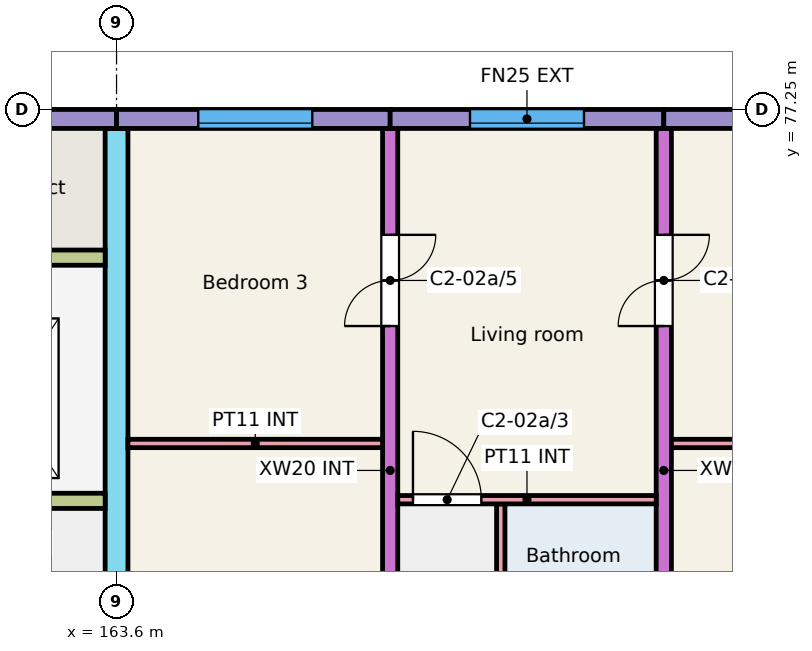
"""IFC4 building model, lengths in metres.
Left out: names, types, materials, properties, quantities, classifications, styles, units other than length and angle.
Written with IfcOpenShell. Run it as: python <this file> out.ifc"""

import sys

from ifc_helpers import new_model, si_unit, direction, frame, frame_2d, origin, place, context, subcontext, project, spatial, rectangle, extrude, element, fill, save


model = new_model("IFC4")
c1 = context("Model", 3, precision=1e-05, world=origin(), true_north=direction((0.0, 1.0)))
c2 = subcontext(c1, "Body", "Model", "MODEL_VIEW")
j1 = project(units=[si_unit("LENGTHUNIT", "METRE"), si_unit("PLANEANGLEUNIT", "RADIAN")], contexts=[c1])
p1 = place(None, origin())
s1 = spatial("IfcSite", under=j1, at=p1, CompositionType="ELEMENT")
p2 = place(p1, origin())
s2 = spatial("IfcBuilding", under=s1, at=p2, CompositionType="ELEMENT")
p3 = place(p2, frame((0.0, 0.0, 6.0)))
s3 = spatial("IfcBuildingStorey", under=s2, at=p3, CompositionType="ELEMENT", Elevation=6.0)
p4 = place(p3, frame((163.6, 66.0, 0.0), z_axis=(0.0, 0.0, 1.0), x_axis=(0.0, 1.0, 0.0)))
e1 = element("IfcWall", 1, at=p4, inside=s3, PredefinedType="SHEAR", context=c2, shape_type="SweptSolid", body=[
    extrude(rectangle(XDim=11.0, YDim=0.3, at=frame_2d((5.5, 0.0))), origin(), (0.0, 0.0, 1.0), 3.0),
])
p5 = place(p4, frame((0.3, 0.0, 0.0)))
e2 = element("IfcOpeningElement", 2, at=p5, cuts=e1, PredefinedType="OPENING", context=c2, shape_type="SweptSolid", body=[
    extrude(rectangle(XDim=1.2, YDim=2.1, at=frame_2d((0.6, 1.05))), frame((0.0, 0.16, 0.0), z_axis=(0.0, -1.0, 0.0), x_axis=(1.0, 0.0, 0.0)), (0.0, 0.0, 1.0), 0.32),
])
p6 = place(p3, frame((167.2, 68.0, 0.0), z_axis=(0.0, 0.0, 1.0), x_axis=(0.0, 1.0, 0.0)))
e3 = element("IfcWall", 3, at=p6, inside=s3, PredefinedType="SHEAR", context=c2, shape_type="SweptSolid", body=[
    extrude(rectangle(XDim=9.0, YDim=0.2, at=frame_2d((4.5, 0.0))), origin(), (0.0, 0.0, 1.0), 3.0),
])
p7 = place(p6, frame((0.175, 0.0, 0.0)))
e4 = element("IfcOpeningElement", 4, at=p7, cuts=e3, PredefinedType="OPENING", context=c2, shape_type="SweptSolid", body=[
    extrude(rectangle(XDim=1.2, YDim=2.1, at=frame_2d((0.6, 1.05))), frame((0.0, 0.11, 0.0), z_axis=(0.0, -1.0, 0.0), x_axis=(1.0, 0.0, 0.0)), (0.0, 0.0, 1.0), 0.22),
])
p8 = place(p6, frame((6.4, 0.0, 0.0)))
e5 = element("IfcOpeningElement", 5, at=p8, cuts=e3, PredefinedType="OPENING", context=c2, shape_type="SweptSolid", body=[
    extrude(rectangle(XDim=1.2, YDim=2.1, at=frame_2d((0.6, 1.05))), frame((0.0, 0.11, 0.0), z_axis=(0.0, -1.0, 0.0), x_axis=(1.0, 0.0, 0.0)), (0.0, 0.0, 1.0), 0.22),
])
p9 = place(p3, frame((170.8, 68.0, 0.0), z_axis=(0.0, 0.0, 1.0), x_axis=(0.0, 1.0, 0.0)))
e6 = element("IfcWall", 6, at=p9, inside=s3, PredefinedType="SHEAR", context=c2, shape_type="SweptSolid", body=[
    extrude(rectangle(XDim=9.0, YDim=0.2, at=frame_2d((4.5, 0.0))), origin(), (0.0, 0.0, 1.0), 3.0),
])
p10 = place(p9, frame((0.175, 0.0, 0.0)))
e7 = element("IfcOpeningElement", 7, at=p10, cuts=e6, PredefinedType="OPENING", context=c2, shape_type="SweptSolid", body=[
    extrude(rectangle(XDim=1.2, YDim=2.1, at=frame_2d((0.6, 1.05))), frame((0.0, 0.11, 0.0), z_axis=(0.0, -1.0, 0.0), x_axis=(1.0, 0.0, 0.0)), (0.0, 0.0, 1.0), 0.22),
])
p11 = place(p9, frame((6.4, 0.0, 0.0)))
e8 = element("IfcOpeningElement", 8, at=p11, cuts=e6, PredefinedType="OPENING", context=c2, shape_type="SweptSolid", body=[
    extrude(rectangle(XDim=1.2, YDim=2.1, at=frame_2d((0.6, 1.05))), frame((0.0, 0.11, 0.0), z_axis=(0.0, -1.0, 0.0), x_axis=(1.0, 0.0, 0.0)), (0.0, 0.0, 1.0), 0.22),
])
p12 = place(p3, frame((160.625, 77.125, 0.0), z_axis=(0.0, 0.0, 1.0), x_axis=(1.0, 0.0, 0.0)))
e9 = element("IfcWall", 9, at=p12, inside=s3, PredefinedType="SOLIDWALL", context=c2, shape_type="SweptSolid", body=[
    extrude(rectangle(XDim=2.975, YDim=0.25, at=frame_2d((1.488, 0.0))), origin(), (0.0, 0.0, 1.0), 3.0),
])
p13 = place(p3, frame((157.725, 72.1, 0.0), z_axis=(0.0, 0.0, 1.0), x_axis=(1.0, 0.0, 0.0)))
e10 = element("IfcWall", 10, at=p13, inside=s3, PredefinedType="SHEAR", context=c2, shape_type="SweptSolid", body=[
    extrude(rectangle(XDim=5.725, YDim=0.2, at=frame_2d((2.862, 0.0))), origin(), (0.0, 0.0, 1.0), 3.0),
])
p14 = place(p13, frame((0.95, 0.0, 0.0)))
e11 = element("IfcOpeningElement", 11, at=p14, cuts=e10, PredefinedType="OPENING", context=c2, shape_type="SweptSolid", body=[
    extrude(rectangle(XDim=1.0, YDim=2.1, at=frame_2d((0.5, 1.05))), frame((0.0, 0.11, 0.0), z_axis=(0.0, -1.0, 0.0), x_axis=(1.0, 0.0, 0.0)), (0.0, 0.0, 1.0), 0.22),
])
p15 = place(p13, frame((3.863, 0.0, 0.0)))
e12 = element("IfcOpeningElement", 12, at=p15, cuts=e10, PredefinedType="OPENING", context=c2, shape_type="SweptSolid", body=[
    extrude(rectangle(XDim=1.1, YDim=2.1, at=frame_2d((0.55, 1.05))), frame((0.0, 0.11, 0.0), z_axis=(0.0, -1.0, 0.0), x_axis=(1.0, 0.0, 0.0)), (0.0, 0.0, 1.0), 0.22),
])
p16 = place(p3, frame((160.825, 75.3, 0.0), z_axis=(0.0, 0.0, 1.0), x_axis=(1.0, 0.0, 0.0)))
e13 = element("IfcWall", 13, at=p16, inside=s3, PredefinedType="SHEAR", context=c2, shape_type="SweptSolid", body=[
    extrude(rectangle(XDim=2.625, YDim=0.2, at=frame_2d((1.312, 0.0))), origin(), (0.0, 0.0, 1.0), 3.0),
])
p17 = place(p3, frame((163.6, 77.125, 0.0), z_axis=(0.0, 0.0, 1.0), x_axis=(1.0, 0.0, 0.0)))
e14 = element("IfcWall", 14, at=p17, inside=s3, PredefinedType="SOLIDWALL", context=c2, shape_type="SweptSolid", body=[
    extrude(rectangle(XDim=3.6, YDim=0.25, at=frame_2d((1.8, 0.0))), origin(), (0.0, 0.0, 1.0), 3.0),
])
p18 = place(p17, frame((1.075, 0.0, 0.9)))
e15 = element("IfcOpeningElement", 15, at=p18, cuts=e14, PredefinedType="OPENING", context=c2, shape_type="SweptSolid", body=[
    extrude(rectangle(XDim=1.5, YDim=1.5, at=frame_2d((0.75, 0.75))), frame((0.0, 0.135, 0.0), z_axis=(0.0, -1.0, 0.0), x_axis=(1.0, 0.0, 0.0)), (0.0, 0.0, 1.0), 0.27),
])
p19 = place(p3, frame((167.2, 77.125, 0.0), z_axis=(0.0, 0.0, 1.0), x_axis=(1.0, 0.0, 0.0)))
e16 = element("IfcWall", 16, at=p19, inside=s3, PredefinedType="SOLIDWALL", context=c2, shape_type="SweptSolid", body=[
    extrude(rectangle(XDim=3.6, YDim=0.25, at=frame_2d((1.8, 0.0))), origin(), (0.0, 0.0, 1.0), 3.0),
])
p20 = place(p19, frame((1.05, 0.0, 0.9)))
e17 = element("IfcOpeningElement", 17, at=p20, cuts=e16, PredefinedType="OPENING", context=c2, shape_type="SweptSolid", body=[
    extrude(rectangle(XDim=1.5, YDim=1.5, at=frame_2d((0.75, 0.75))), frame((0.0, 0.135, 0.0), z_axis=(0.0, -1.0, 0.0), x_axis=(1.0, 0.0, 0.0)), (0.0, 0.0, 1.0), 0.27),
])
p21 = place(p3, frame((170.8, 77.125, 0.0), z_axis=(0.0, 0.0, 1.0), x_axis=(1.0, 0.0, 0.0)))
e18 = element("IfcWall", 18, at=p21, inside=s3, PredefinedType="SOLIDWALL", context=c2, shape_type="SweptSolid", body=[
    extrude(rectangle(XDim=3.6, YDim=0.25, at=frame_2d((1.8, 0.0))), origin(), (0.0, 0.0, 1.0), 3.0),
])
p22 = place(p21, frame((1.188, 0.0, 1.1)))
e19 = element("IfcOpeningElement", 19, at=p22, cuts=e18, PredefinedType="OPENING", context=c2, shape_type="SweptSolid", body=[
    extrude(rectangle(XDim=1.2, YDim=1.3, at=frame_2d((0.6, 0.65))), frame((0.0, 0.135, 0.0), z_axis=(0.0, -1.0, 0.0), x_axis=(1.0, 0.0, 0.0)), (0.0, 0.0, 1.0), 0.27),
])
p23 = place(p3, frame((168.655, 69.66, 0.0), z_axis=(0.0, 0.0, 1.0), x_axis=(0.0, 1.0, 0.0)))
e20 = element("IfcWall", 20, at=p23, inside=s3, PredefinedType="PARTITIONING", context=c2, shape_type="SweptSolid", body=[
    extrude(rectangle(XDim=2.4, YDim=0.11, at=frame_2d((1.2, 0.0))), origin(), (0.0, 0.0, 1.0), 2.8),
])
p24 = place(p3, frame((167.3, 72.115, 0.0), z_axis=(0.0, 0.0, 1.0), x_axis=(1.0, 0.0, 0.0)))
e21 = element("IfcWall", 21, at=p24, inside=s3, PredefinedType="PARTITIONING", context=c2, shape_type="SweptSolid", body=[
    extrude(rectangle(XDim=3.4, YDim=0.11, at=frame_2d((1.7, 0.0))), origin(), (0.0, 0.0, 1.0), 2.8),
])
p25 = place(p24, frame((0.2, 0.0, 0.0)))
e22 = element("IfcOpeningElement", 22, at=p25, cuts=e21, PredefinedType="OPENING", context=c2, shape_type="SweptSolid", body=[
    extrude(rectangle(XDim=0.9, YDim=2.1, at=frame_2d((0.45, 1.05))), frame((0.0, 0.065, 0.0), z_axis=(0.0, -1.0, 0.0), x_axis=(1.0, 0.0, 0.0)), (0.0, 0.0, 1.0), 0.13),
])
p26 = place(p3, frame((163.75, 72.855, 0.0), z_axis=(0.0, 0.0, 1.0), x_axis=(1.0, 0.0, 0.0)))
e23 = element("IfcWall", 23, at=p26, inside=s3, PredefinedType="PARTITIONING", context=c2, shape_type="SweptSolid", body=[
    extrude(rectangle(XDim=3.35, YDim=0.11, at=frame_2d((1.675, 0.0))), origin(), (0.0, 0.0, 1.0), 2.8),
])
p27 = place(p3, frame((170.9, 72.855, 0.0), z_axis=(0.0, 0.0, 1.0), x_axis=(1.0, 0.0, 0.0)))
e24 = element("IfcWall", 24, at=p27, inside=s3, PredefinedType="PARTITIONING", context=c2, shape_type="SweptSolid", body=[
    extrude(rectangle(XDim=3.375, YDim=0.11, at=frame_2d((1.688, 0.0))), origin(), (0.0, 0.0, 1.0), 2.8),
])
p28 = place(p18, origin())
e25 = element("IfcWindow", 25, at=p28, inside=s3, PartitioningType="SINGLE_PANEL", PredefinedType="WINDOW", context=c2, shape_type="SweptSolid", body=[
    extrude(rectangle(XDim=1.5, YDim=1.5, at=frame_2d((0.75, 0.75))), frame((0.0, -0.025, 0.0), z_axis=(0.0, -1.0, 0.0), x_axis=(1.0, 0.0, 0.0)), (0.0, 0.0, 1.0), 0.06),
])
fill(e15, e25)
p29 = place(p20, origin())
e26 = element("IfcWindow", 26, at=p29, inside=s3, PartitioningType="SINGLE_PANEL", PredefinedType="WINDOW", context=c2, shape_type="SweptSolid", body=[
    extrude(rectangle(XDim=1.5, YDim=1.5, at=frame_2d((0.75, 0.75))), frame((0.0, -0.025, 0.0), z_axis=(0.0, -1.0, 0.0), x_axis=(1.0, 0.0, 0.0)), (0.0, 0.0, 1.0), 0.06),
])
fill(e17, e26)
p30 = place(p25, origin())
e27 = element("IfcDoor", 27, at=p30, inside=s3, OperationType="SINGLE_SWING_LEFT", PredefinedType="DOOR", context=c2, shape_type="SweptSolid", body=[
    extrude(rectangle(XDim=0.9, YDim=2.1, at=frame_2d((0.45, 1.05))), frame((0.0, 0.025, 0.0), z_axis=(0.0, -1.0, 0.0), x_axis=(1.0, 0.0, 0.0)), (0.0, 0.0, 1.0), 0.05),
])
fill(e22, e27)
p31 = place(p8, origin())
e28 = element("IfcDoor", 28, at=p31, inside=s3, OperationType="DOUBLE_DOOR_SINGLE_SWING", PredefinedType="DOOR", context=c2, shape_type="SweptSolid", body=[
    extrude(rectangle(XDim=1.2, YDim=2.1, at=frame_2d((0.6, 1.05))), frame((0.0, 0.025, 0.0), z_axis=(0.0, -1.0, 0.0), x_axis=(1.0, 0.0, 0.0)), (0.0, 0.0, 1.0), 0.05),
])
fill(e5, e28)
p32 = place(p11, origin())
e29 = element("IfcDoor", 29, at=p32, inside=s3, OperationType="DOUBLE_DOOR_SINGLE_SWING", PredefinedType="DOOR", context=c2, shape_type="SweptSolid", body=[
    extrude(rectangle(XDim=1.2, YDim=2.1, at=frame_2d((0.6, 1.05))), frame((0.0, 0.025, 0.0), z_axis=(0.0, -1.0, 0.0), x_axis=(1.0, 0.0, 0.0)), (0.0, 0.0, 1.0), 0.05),
])
fill(e8, e29)
save(model, sys.argv[1])
